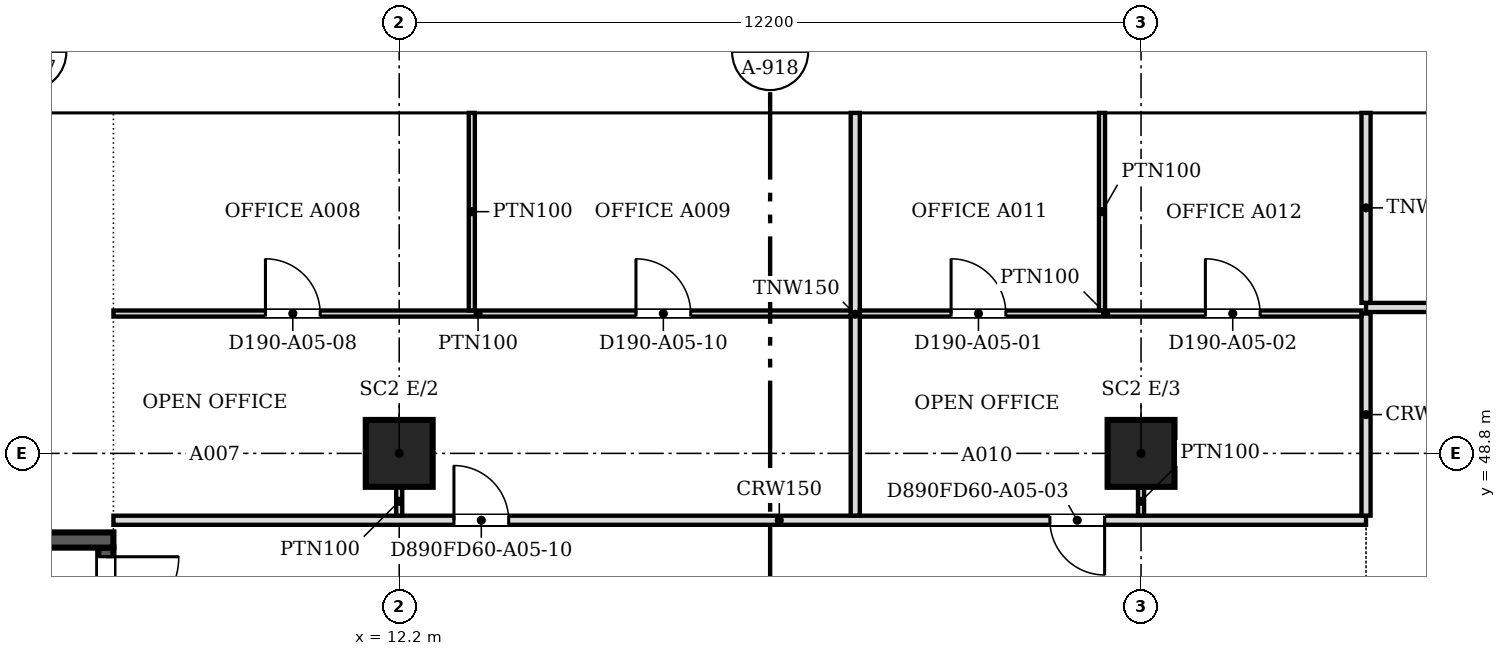
"""IFC4 building model, lengths in metres.
Left out: names, types, materials, properties, quantities, classifications, styles, units other than length and angle.
Written with IfcOpenShell. Run it as: python <this file> out.ifc"""

import sys

from ifc_helpers import new_model, si_unit, direction, frame, frame_2d, origin, origin_2d, place, context, subcontext, project, spatial, polyline, rectangle, outline, extrude, faceted_brep, source, transform, mapped, element, fill, save


model = new_model("IFC4")
c1 = context("Model", 3, precision=1e-05, world=origin(), true_north=direction((0.0, 1.0)))
c2 = subcontext(c1, "Body", "Model", "MODEL_VIEW")
j1 = project(units=[si_unit("LENGTHUNIT", "METRE"), si_unit("PLANEANGLEUNIT", "RADIAN")], contexts=[c1])
p1 = place(None, origin())
s1 = spatial("IfcSite", under=j1, at=p1, CompositionType="ELEMENT")
p2 = place(p1, origin())
s2 = spatial("IfcBuilding", under=s1, at=p2, CompositionType="ELEMENT")
p3 = place(p2, frame((0.0, 0.0, 60.0)))
s3 = spatial("IfcBuildingStorey", under=s2, at=p3, CompositionType="ELEMENT", Elevation=60.0)
for number, where, z_axis, x_axis in (
    (1, (12.2, 48.8, 0.0), (0.0, 0.0, 1.0), (1.0, 0.0, 0.0)),
    (2, (24.4, 48.8, 0.0), (0.0, 0.0, 1.0), (1.0, 0.0, 0.0)),
):
    element("IfcColumn", number, at=place(p3, frame(where, z_axis=z_axis, x_axis=x_axis)), inside=s3, PredefinedType="COLUMN", context=c2, shape_type="SweptSolid", body=[
        extrude(rectangle(XDim=1.1, YDim=1.1, at=origin_2d()), origin(), (0.0, 0.0, 1.0), 3.5),
    ])
m1 = source(origin(), c2, "Body", "SweptSolid", [
    extrude(outline(polyline([(3.05, 0.0), (6.1, 3.8), (3.05, 7.6), (0.0, 3.8), (3.05, 0.0)])), frame((0.0, 0.25, 0.0), z_axis=(0.0, -1.0, 0.0), x_axis=(1.0, 0.0, 0.0)), (0.0, 0.0, 1.0), 0.5),
])
p4 = place(p3, frame((30.5, 54.65, -3.8), z_axis=(0.0, 0.0, 1.0), x_axis=(-1.0, 0.0, 0.0)))
e3 = element("IfcWall", 3, at=p4, inside=s3, PredefinedType="SOLIDWALL", context=c2, shape_type="MappedRepresentation", body=[
    mapped(m1, transform((0.0, 0.0, 0.0), scale=1.0)),
])
m2 = source(origin(), c2, "Body", "SweptSolid", [
    extrude(outline(polyline([(3.05, 0.399), (5.78, 3.8), (3.05, 7.201), (0.321, 3.8), (3.05, 0.399)])), frame((0.0, 0.26, 0.0), z_axis=(0.0, -1.0, 0.0), x_axis=(1.0, 0.0, 0.0)), (0.0, 0.0, 1.0), 0.52),
])
p5 = place(p4, origin())
e4 = element("IfcOpeningElement", 4, at=p5, cuts=e3, PredefinedType="OPENING", context=c2, shape_type="MappedRepresentation", body=[
    mapped(m2, transform((0.0, 0.0, 0.0), scale=1.0)),
])
m3 = source(origin(), c2, "Body", "Brep", [
    faceted_brep([(3.05, -0.25, 0.0), (6.1, -0.25, 3.8), (6.1, -0.25, 3.8), (3.05, -0.25, 7.6), (0.0, -0.25, 3.8), (0.0, 0.25, 3.8), (3.05, 0.25, 7.6), (6.1, 0.25, 3.8), (6.1, 0.25, 3.8), (3.05, 0.25, 0.0)], [[[0, 1, 2, 3, 4]], [[5, 6, 7, 8, 9]], [[9, 8, 1, 0]], [[7, 6, 3, 2]], [[6, 5, 4, 3]], [[5, 9, 0, 4]], [[1, 8, 7, 2]]]),
])
p6 = place(p3, frame((24.4, 54.65, -3.8), z_axis=(0.0, 0.0, 1.0), x_axis=(-1.0, 0.0, 0.0)))
e5 = element("IfcWall", 5, at=p6, inside=s3, PredefinedType="SOLIDWALL", context=c2, shape_type="MappedRepresentation", body=[
    mapped(m3, transform((0.0, 0.0, 0.0), scale=1.0)),
])
p7 = place(p6, origin())
e6 = element("IfcOpeningElement", 6, at=p7, cuts=e5, PredefinedType="OPENING", context=c2, shape_type="MappedRepresentation", body=[
    mapped(m2, transform((0.0, 0.0, 0.0), scale=1.0)),
])
p8 = place(p3, frame((18.3, 54.65, -3.8), z_axis=(0.0, 0.0, 1.0), x_axis=(-1.0, 0.0, 0.0)))
e7 = element("IfcWall", 7, at=p8, inside=s3, PredefinedType="SOLIDWALL", context=c2, shape_type="MappedRepresentation", body=[
    mapped(m1, transform((0.0, 0.0, 0.0), scale=1.0)),
])
p9 = place(p8, origin())
e8 = element("IfcOpeningElement", 8, at=p9, cuts=e7, PredefinedType="OPENING", context=c2, shape_type="MappedRepresentation", body=[
    mapped(m2, transform((0.0, 0.0, 0.0), scale=1.0)),
])
m4 = source(origin(), c2, "Body", "Brep", [
    faceted_brep([(3.05, -0.25, 0.0), (6.053, -0.25, 3.8), (3.05, -0.25, 7.6), (0.0, -0.25, 3.8), (0.0, 0.25, 3.8), (3.05, 0.25, 7.6), (6.007, 0.25, 3.859), (6.007, 0.25, 3.741), (3.05, 0.25, 0.0), (6.053, 0.0, 3.8)], [[[0, 1, 2, 3]], [[4, 5, 6, 7, 8]], [[8, 7, 9, 1, 0]], [[6, 5, 2, 1, 9]], [[5, 4, 3, 2]], [[4, 8, 0, 3]], [[9, 7, 6]]]),
])
p10 = place(p3, frame((12.2, 54.65, -3.8), z_axis=(0.0, 0.0, 1.0), x_axis=(-1.0, 0.0, 0.0)))
e9 = element("IfcWall", 9, at=p10, inside=s3, PredefinedType="SOLIDWALL", context=c2, shape_type="MappedRepresentation", body=[
    mapped(m4, transform((0.0, 0.0, 0.0), scale=1.0)),
])
m5 = source(origin(), c2, "Body", "SweptSolid", [
    extrude(outline(polyline([(3.049, 0.401), (5.735, 3.8), (3.049, 7.199), (0.321, 3.8), (3.049, 0.401)])), frame((0.0, 0.26, 0.0), z_axis=(0.0, -1.0, 0.0), x_axis=(1.0, 0.0, 0.0)), (0.0, 0.0, 1.0), 0.52),
])
p11 = place(p10, origin())
e10 = element("IfcOpeningElement", 10, at=p11, cuts=e9, PredefinedType="OPENING", context=c2, shape_type="MappedRepresentation", body=[
    mapped(m5, transform((0.0, 0.0, 0.0), scale=1.0)),
])
m6 = source(origin(), c2, "Body", "SweptSolid", [
    extrude(outline(polyline([(3.05, 0.0), (6.1, 3.8), (0.0, 3.8), (3.05, 0.0)])), frame((0.0, 0.25, 0.0), z_axis=(0.0, -1.0, 0.0), x_axis=(1.0, 0.0, 0.0)), (0.0, 0.0, 1.0), 0.5),
])
p12 = place(p3, frame((33.55, 54.65, 0.0), z_axis=(0.0, 0.0, 1.0), x_axis=(-1.0, 0.0, 0.0)))
e11 = element("IfcWall", 11, at=p12, inside=s3, PredefinedType="SOLIDWALL", context=c2, shape_type="MappedRepresentation", body=[
    mapped(m6, transform((0.0, 0.0, 0.0), scale=1.0)),
])
m7 = source(origin(), c2, "Body", "SweptSolid", [
    extrude(outline(polyline([(3.05, 0.399), (5.579, 3.55), (0.521, 3.55), (3.05, 0.399)])), frame((0.0, 0.26, 0.0), z_axis=(0.0, -1.0, 0.0), x_axis=(1.0, 0.0, 0.0)), (0.0, 0.0, 1.0), 0.52),
])
p13 = place(p12, origin())
e12 = element("IfcOpeningElement", 12, at=p13, cuts=e11, PredefinedType="OPENING", context=c2, shape_type="MappedRepresentation", body=[
    mapped(m7, transform((0.0, 0.0, 0.0), scale=1.0)),
])
m8 = source(origin(), c2, "Body", "Brep", [
    faceted_brep([(3.05, -0.25, 0.0), (6.1, -0.25, 3.8), (6.1, -0.25, 3.8), (0.0, -0.25, 3.8), (0.0, 0.25, 3.8), (6.1, 0.25, 3.8), (6.1, 0.25, 3.8), (3.05, 0.25, 0.0)], [[[0, 1, 2, 3]], [[4, 5, 6, 7]], [[7, 6, 1, 0]], [[5, 4, 3, 2]], [[4, 7, 0, 3]], [[1, 6, 5, 2]]]),
])
p14 = place(p3, frame((27.45, 54.65, 0.0), z_axis=(0.0, 0.0, 1.0), x_axis=(-1.0, 0.0, 0.0)))
e13 = element("IfcWall", 13, at=p14, inside=s3, PredefinedType="SOLIDWALL", context=c2, shape_type="MappedRepresentation", body=[
    mapped(m8, transform((0.0, 0.0, 0.0), scale=1.0)),
])
p15 = place(p14, origin())
e14 = element("IfcOpeningElement", 14, at=p15, cuts=e13, PredefinedType="OPENING", context=c2, shape_type="MappedRepresentation", body=[
    mapped(m7, transform((0.0, 0.0, 0.0), scale=1.0)),
])
p16 = place(p3, frame((21.35, 54.65, 0.0), z_axis=(0.0, 0.0, 1.0), x_axis=(-1.0, 0.0, 0.0)))
e15 = element("IfcWall", 15, at=p16, inside=s3, PredefinedType="SOLIDWALL", context=c2, shape_type="MappedRepresentation", body=[
    mapped(m6, transform((0.0, 0.0, 0.0), scale=1.0)),
])
p17 = place(p16, origin())
e16 = element("IfcOpeningElement", 16, at=p17, cuts=e15, PredefinedType="OPENING", context=c2, shape_type="MappedRepresentation", body=[
    mapped(m7, transform((0.0, 0.0, 0.0), scale=1.0)),
])
p18 = place(p3, frame((15.25, 54.65, 0.0), z_axis=(0.0, 0.0, 1.0), x_axis=(-1.0, 0.0, 0.0)))
e17 = element("IfcWall", 17, at=p18, inside=s3, PredefinedType="SOLIDWALL", context=c2, shape_type="MappedRepresentation", body=[
    mapped(m6, transform((0.0, 0.0, 0.0), scale=1.0)),
])
p19 = place(p18, origin())
e18 = element("IfcOpeningElement", 18, at=p19, cuts=e17, PredefinedType="OPENING", context=c2, shape_type="MappedRepresentation", body=[
    mapped(m7, transform((0.0, 0.0, 0.0), scale=1.0)),
])
m9 = source(origin(), c2, "Body", "Brep", [
    faceted_brep([(3.003, -0.25, 0.0), (3.05, -0.25, 0.06), (3.05, -0.25, 3.8), (0.0, -0.25, 3.8), (0.0, 0.25, 3.8), (2.957, 0.25, 3.8), (2.957, 0.25, 0.059), (3.003, 0.0, 0.0)], [[[0, 1, 2, 3]], [[4, 5, 6]], [[1, 0, 7]], [[5, 4, 3, 2]], [[4, 6, 7, 0, 3]], [[1, 7, 6, 5, 2]]]),
])
p20 = place(p3, frame((9.15, 54.65, 0.0), z_axis=(0.0, 0.0, 1.0), x_axis=(-1.0, 0.0, 0.0)))
e19 = element("IfcWall", 19, at=p20, inside=s3, PredefinedType="SOLIDWALL", context=c2, shape_type="MappedRepresentation", body=[
    mapped(m9, transform((0.0, 0.0, 0.0), scale=1.0)),
])
m10 = source(origin(), c2, "Body", "SweptSolid", [
    extrude(outline(polyline([(2.803, 3.55), (0.516, 3.55), (2.803, 0.656), (2.803, 3.55)])), frame((0.0, 0.26, 0.0), z_axis=(0.0, -1.0, 0.0), x_axis=(1.0, 0.0, 0.0)), (0.0, 0.0, 1.0), 0.52),
])
p21 = place(p20, origin())
e20 = element("IfcOpeningElement", 20, at=p21, cuts=e19, PredefinedType="OPENING", context=c2, shape_type="MappedRepresentation", body=[
    mapped(m10, transform((0.0, 0.0, 0.0), scale=1.0)),
])
p22 = place(p3, frame((3.6, 47.375, 0.0), z_axis=(0.0, 0.0, 1.0), x_axis=(1.0, 0.0, 0.0)))
e21 = element("IfcWall", 21, at=p22, inside=s3, PredefinedType="SOLIDWALL", context=c2, shape_type="SweptSolid", body=[
    extrude(rectangle(XDim=3.9, YDim=0.25, at=frame_2d((1.95, 0.0))), origin(), (0.0, 0.0, 1.0), 3.8),
])
p23 = place(p3, frame((7.375, 47.25, 0.0), z_axis=(0.0, 0.0, 1.0), x_axis=(0.0, -1.0, 0.0)))
e22 = element("IfcWall", 22, at=p23, inside=s3, PredefinedType="SOLIDWALL", context=c2, shape_type="SweptSolid", body=[
    extrude(rectangle(XDim=8.0, YDim=0.25, at=frame_2d((4.0, 0.0))), origin(), (0.0, 0.0, 1.0), 3.8),
])
m11 = source(origin(), c2, "Body", "SweptSolid", [
    extrude(rectangle(XDim=1.2, YDim=2.1, at=frame_2d((0.6, 1.05))), frame((0.0, 0.135, 0.0), z_axis=(0.0, -1.0, 0.0), x_axis=(1.0, 0.0, 0.0)), (0.0, 0.0, 1.0), 0.27),
])
p24 = place(p23, frame((0.15, 0.0, 0.0)))
e23 = element("IfcOpeningElement", 23, at=p24, cuts=e22, PredefinedType="OPENING", context=c2, shape_type="MappedRepresentation", body=[
    mapped(m11, transform((0.0, 0.0, 0.0), scale=1.0)),
])
p25 = place(p3, frame((7.5, 47.7, 0.0), z_axis=(0.0, 0.0, 1.0), x_axis=(1.0, 0.0, 0.0)))
e24 = element("IfcWall", 24, at=p25, inside=s3, PredefinedType="PARTITIONING", context=c2, shape_type="SweptSolid", body=[
    extrude(rectangle(XDim=20.6, YDim=0.15, at=frame_2d((10.3, 0.0))), origin(), (0.0, 0.0, 1.0), 2.888),
])
m12 = source(origin(), c2, "Body", "SweptSolid", [
    extrude(rectangle(XDim=0.9, YDim=2.1, at=frame_2d((0.45, 1.05))), frame((0.0, 0.085, 0.0), z_axis=(0.0, -1.0, 0.0), x_axis=(1.0, 0.0, 0.0)), (0.0, 0.0, 1.0), 0.17),
])
p26 = place(p25, frame((15.401, 0.0, 0.0)))
e25 = element("IfcOpeningElement", 25, at=p26, cuts=e24, PredefinedType="OPENING", context=c2, shape_type="MappedRepresentation", body=[
    mapped(m12, transform((0.0, 0.0, 0.0), scale=1.0)),
])
p27 = place(p25, frame((5.6, 0.0, 0.0)))
e26 = element("IfcOpeningElement", 26, at=p27, cuts=e24, PredefinedType="OPENING", context=c2, shape_type="MappedRepresentation", body=[
    mapped(m12, transform((0.0, 0.0, 0.0), scale=1.0)),
])
p28 = place(p3, frame((19.7, 47.776, 0.0), z_axis=(0.0, 0.0, 1.0), x_axis=(0.0, 1.0, 0.0)))
e27 = element("IfcWall", 27, at=p28, inside=s3, PredefinedType="PARTITIONING", context=c2, shape_type="SweptSolid", body=[
    extrude(rectangle(XDim=6.624, YDim=0.15, at=frame_2d((3.312, 0.0))), origin(), (0.0, 0.0, 1.0), 2.888),
])
p29 = place(p3, frame((28.1, 47.776, 0.0), z_axis=(0.0, 0.0, 1.0), x_axis=(0.0, 1.0, 0.0)))
e28 = element("IfcWall", 28, at=p29, inside=s3, PredefinedType="PARTITIONING", context=c2, shape_type="SweptSolid", body=[
    extrude(rectangle(XDim=3.324, YDim=0.15, at=frame_2d((1.662, 0.0))), origin(), (0.0, 0.0, 1.0), 2.888),
])
for number, where, z_axis, x_axis in (
    (29, (12.2, 48.25, 0.0), (0.0, 0.0, 1.0), (0.0, -1.0, 0.0)),
    (30, (24.4, 48.25, 0.0), (0.0, 0.0, 1.0), (0.0, -1.0, 0.0)),
):
    element("IfcWall", number, at=place(p3, frame(where, z_axis=z_axis, x_axis=x_axis)), inside=s3, PredefinedType="PARTITIONING", context=c2, shape_type="SweptSolid", body=[
        extrude(rectangle(XDim=0.475, YDim=0.1, at=frame_2d((0.238, 0.0))), origin(), (0.0, 0.0, 1.0), 2.888),
    ])
p30 = place(p3, frame((7.5, 51.1, 0.0), z_axis=(0.0, 0.0, 1.0), x_axis=(1.0, 0.0, 0.0)))
e31 = element("IfcWall", 31, at=p30, inside=s3, PredefinedType="PARTITIONING", context=c2, shape_type="SweptSolid", body=[
    extrude(rectangle(XDim=12.124, YDim=0.1, at=frame_2d((6.062, 0.0))), origin(), (0.0, 0.0, 1.0), 2.888),
])
m13 = source(origin(), c2, "Body", "SweptSolid", [
    extrude(rectangle(XDim=0.9, YDim=2.1, at=frame_2d((0.45, 1.05))), frame((0.0, 0.06, 0.0), z_axis=(0.0, -1.0, 0.0), x_axis=(1.0, 0.0, 0.0)), (0.0, 0.0, 1.0), 0.12),
])
p31 = place(p30, frame((2.5, 0.0, 0.0)))
e32 = element("IfcOpeningElement", 32, at=p31, cuts=e31, PredefinedType="OPENING", context=c2, shape_type="MappedRepresentation", body=[
    mapped(m13, transform((0.0, 0.0, 0.0), scale=1.0)),
])
p32 = place(p30, frame((8.594, 0.0, 0.0)))
e33 = element("IfcOpeningElement", 33, at=p32, cuts=e31, PredefinedType="OPENING", context=c2, shape_type="MappedRepresentation", body=[
    mapped(m13, transform((0.0, 0.0, 0.0), scale=1.0)),
])
p33 = place(p3, frame((19.776, 51.1, 0.0), z_axis=(0.0, 0.0, 1.0), x_axis=(1.0, 0.0, 0.0)))
e34 = element("IfcWall", 34, at=p33, inside=s3, PredefinedType="PARTITIONING", context=c2, shape_type="SweptSolid", body=[
    extrude(rectangle(XDim=8.248, YDim=0.1, at=frame_2d((4.124, 0.0))), origin(), (0.0, 0.0, 1.0), 2.888),
])
p34 = place(p33, frame((1.5, 0.0, 0.0)))
e35 = element("IfcOpeningElement", 35, at=p34, cuts=e34, PredefinedType="OPENING", context=c2, shape_type="MappedRepresentation", body=[
    mapped(m13, transform((0.0, 0.0, 0.0), scale=1.0)),
])
p35 = place(p33, frame((5.682, 0.0, 0.0)))
e36 = element("IfcOpeningElement", 36, at=p35, cuts=e34, PredefinedType="OPENING", context=c2, shape_type="MappedRepresentation", body=[
    mapped(m13, transform((0.0, 0.0, 0.0), scale=1.0)),
])
for number, where, z_axis, x_axis in (
    (37, (13.394, 51.151, 0.0), (0.0, 0.0, 1.0), (0.0, 1.0, 0.0)),
    (38, (23.758, 51.151, 0.0), (0.0, 0.0, 1.0), (0.0, 1.0, 0.0)),
):
    element("IfcWall", number, at=place(p3, frame(where, z_axis=z_axis, x_axis=x_axis)), inside=s3, PredefinedType="PARTITIONING", context=c2, shape_type="SweptSolid", body=[
        extrude(rectangle(XDim=3.249, YDim=0.1, at=frame_2d((1.625, 0.0))), origin(), (0.0, 0.0, 1.0), 2.888),
    ])
p36 = place(p3, frame((28.1, 51.2, 0.0), z_axis=(0.0, 0.0, 1.0), x_axis=(1.0, 0.0, 0.0)))
e39 = element("IfcWall", 39, at=p36, inside=s3, PredefinedType="PARTITIONING", context=c2, shape_type="SweptSolid", body=[
    extrude(rectangle(XDim=31.438, YDim=0.15, at=frame_2d((15.719, 0.0))), origin(), (0.0, 0.0, 1.0), 2.888),
])
p37 = place(p36, frame((16.301, 0.0, 0.0)))
e40 = element("IfcOpeningElement", 40, at=p37, cuts=e39, PredefinedType="OPENING", context=c2, shape_type="MappedRepresentation", body=[
    mapped(m12, transform((0.0, 0.0, 0.0), scale=1.0)),
])
p38 = place(p36, frame((25.95, 0.0, 0.0)))
e41 = element("IfcOpeningElement", 41, at=p38, cuts=e39, PredefinedType="OPENING", context=c2, shape_type="MappedRepresentation", body=[
    mapped(m12, transform((0.0, 0.0, 0.0), scale=1.0)),
])
p39 = place(p36, frame((5.6, 0.0, 0.0)))
e42 = element("IfcOpeningElement", 42, at=p39, cuts=e39, PredefinedType="OPENING", context=c2, shape_type="MappedRepresentation", body=[
    mapped(m12, transform((0.0, 0.0, 0.0), scale=1.0)),
])
p40 = place(p3, frame((28.1, 51.276, 0.0), z_axis=(0.0, 0.0, 1.0), x_axis=(0.0, 1.0, 0.0)))
e43 = element("IfcWall", 43, at=p40, inside=s3, PredefinedType="PARTITIONING", context=c2, shape_type="SweptSolid", body=[
    extrude(rectangle(XDim=3.124, YDim=0.15, at=frame_2d((1.562, 0.0))), origin(), (0.0, 0.0, 1.0), 2.888),
])
m14 = source(origin(), c2, "Body", "SweptSolid", [
    extrude(rectangle(XDim=1.2, YDim=2.1, at=frame_2d((0.6, 1.05))), frame((0.0, 0.025, 0.0), z_axis=(0.0, -1.0, 0.0), x_axis=(1.0, 0.0, 0.0)), (0.0, 0.0, 1.0), 0.05),
])
p41 = place(p24, origin())
e44 = element("IfcDoor", 44, at=p41, inside=s3, OperationType="SINGLE_SWING_LEFT", PredefinedType="DOOR", context=c2, shape_type="MappedRepresentation", body=[
    mapped(m14, transform((0.0, 0.0, 0.0), scale=1.0)),
])
fill(e23, e44)
m15 = source(origin(), c2, "Body", "SweptSolid", [
    extrude(rectangle(XDim=0.9, YDim=2.1, at=frame_2d((0.45, 1.05))), frame((0.0, 0.025, 0.0), z_axis=(0.0, -1.0, 0.0), x_axis=(1.0, 0.0, 0.0)), (0.0, 0.0, 1.0), 0.05),
])
p42 = place(p34, origin())
e45 = element("IfcDoor", 45, at=p42, inside=s3, OperationType="SINGLE_SWING_LEFT", PredefinedType="DOOR", context=c2, shape_type="MappedRepresentation", body=[
    mapped(m15, transform((0.0, 0.0, 0.0), scale=1.0)),
])
fill(e35, e45)
p43 = place(p35, origin())
e46 = element("IfcDoor", 46, at=p43, inside=s3, OperationType="SINGLE_SWING_LEFT", PredefinedType="DOOR", context=c2, shape_type="MappedRepresentation", body=[
    mapped(m15, transform((0.0, 0.0, 0.0), scale=1.0)),
])
fill(e36, e46)
p44 = place(p31, origin())
e47 = element("IfcDoor", 47, at=p44, inside=s3, OperationType="SINGLE_SWING_LEFT", PredefinedType="DOOR", context=c2, shape_type="MappedRepresentation", body=[
    mapped(m15, transform((0.0, 0.0, 0.0), scale=1.0)),
])
fill(e32, e47)
p45 = place(p32, origin())
e48 = element("IfcDoor", 48, at=p45, inside=s3, OperationType="SINGLE_SWING_LEFT", PredefinedType="DOOR", context=c2, shape_type="MappedRepresentation", body=[
    mapped(m15, transform((0.0, 0.0, 0.0), scale=1.0)),
])
fill(e33, e48)
p46 = place(p26, origin())
e49 = element("IfcDoor", 49, at=p46, inside=s3, OperationType="SINGLE_SWING_RIGHT", PredefinedType="DOOR", context=c2, shape_type="MappedRepresentation", body=[
    mapped(m15, transform((0.0, 0.0, 0.0), scale=1.0)),
])
fill(e25, e49)
p47 = place(p27, origin())
e50 = element("IfcDoor", 50, at=p47, inside=s3, OperationType="SINGLE_SWING_LEFT", PredefinedType="DOOR", context=c2, shape_type="MappedRepresentation", body=[
    mapped(m15, transform((0.0, 0.0, 0.0), scale=1.0)),
])
fill(e26, e50)
save(model, sys.argv[1])
